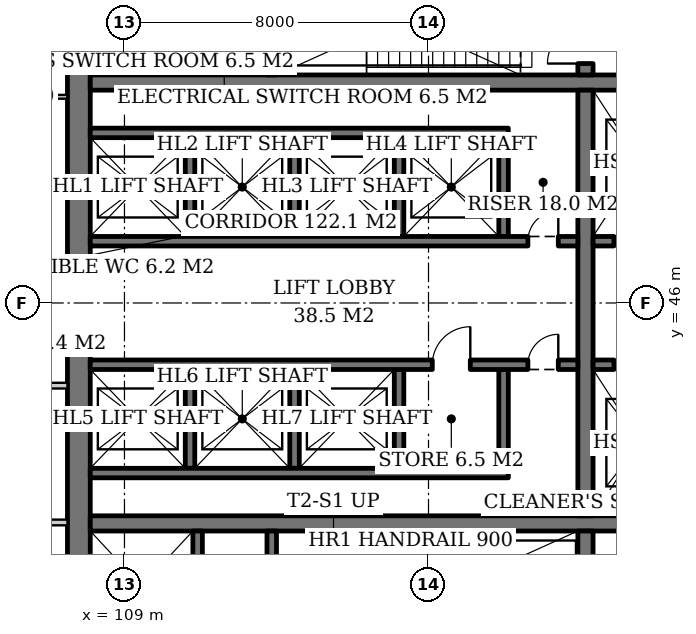
"""IFC4 building model, lengths in metres.
Left out: names, types, materials, properties, quantities, classifications, styles, units other than length and angle.
Written with IfcOpenShell. Run it as: python <this file> out.ifc"""

import sys

from ifc_helpers import new_model, si_unit, direction, frame, frame_2d, origin, place, context, subcontext, project, spatial, rectangle, extrude, element, fill, save


model = new_model("IFC4")
c1 = context("Model", 3, precision=1e-05, world=origin(), true_north=direction((0.0, 1.0)))
c2 = subcontext(c1, "Body", "Model", "MODEL_VIEW")
j1 = project(units=[si_unit("LENGTHUNIT", "METRE"), si_unit("PLANEANGLEUNIT", "RADIAN")], contexts=[c1])
p1 = place(None, origin())
s1 = spatial("IfcSite", under=j1, at=p1, CompositionType="ELEMENT")
p2 = place(p1, origin())
s2 = spatial("IfcBuilding", under=s1, at=p2, CompositionType="ELEMENT")
p3 = place(p2, frame((0.0, 0.0, 11.0)))
s3 = spatial("IfcBuildingStorey", under=s2, at=p3, CompositionType="ELEMENT", Elevation=11.0)
p4 = place(p3, frame((107.8, 37.1, 0.0), z_axis=(0.0, 0.0, 1.0), x_axis=(0.0, 1.0, 0.0)))
e1 = element("IfcWall", 1, at=p4, inside=s3, PredefinedType="SHEAR", context=c2, shape_type="SweptSolid", body=[
    extrude(rectangle(XDim=17.8, YDim=0.6, at=frame_2d((8.9, 0.0))), origin(), (0.0, 0.0, 1.0), 5.0),
])
p5 = place(p4, frame((8.0, 0.0, 0.0)))
e2 = element("IfcOpeningElement", 2, at=p5, cuts=e1, PredefinedType="OPENING", context=c2, shape_type="SweptSolid", body=[
    extrude(rectangle(XDim=1.8, YDim=2.4, at=frame_2d((0.9, 1.2))), frame((0.0, 0.31, 0.0), z_axis=(0.0, -1.0, 0.0), x_axis=(1.0, 0.0, 0.0)), (0.0, 0.0, 1.0), 0.62),
])
for number, where, z_axis, x_axis in (
    (3, (108.1, 40.2, 0.0), (0.0, 0.0, 1.0), (1.0, 0.0, 0.0)),
    (4, (108.1, 51.8, 0.0), (0.0, 0.0, 1.0), (1.0, 0.0, 0.0)),
):
    element("IfcWall", number, at=place(p3, frame(where, z_axis=z_axis, x_axis=x_axis)), inside=s3, PredefinedType="SHEAR", context=c2, shape_type="SweptSolid", body=[
        extrude(rectangle(XDim=17.8, YDim=0.4, at=frame_2d((8.9, 0.0))), origin(), (0.0, 0.0, 1.0), 5.0),
    ])
p6 = place(p3, frame((121.13, 37.1, 0.0), z_axis=(0.0, 0.0, 1.0), x_axis=(0.0, 1.0, 0.0)))
e5 = element("IfcWall", 5, at=p6, inside=s3, PredefinedType="SHEAR", context=c2, shape_type="SweptSolid", body=[
    extrude(rectangle(XDim=2.9, YDim=0.4, at=frame_2d((1.45, 0.0))), origin(), (0.0, 0.0, 1.0), 5.0),
])
p7 = place(p3, frame((121.13, 40.4, 0.0), z_axis=(0.0, 0.0, 1.0), x_axis=(0.0, 1.0, 0.0)))
e6 = element("IfcWall", 6, at=p7, inside=s3, PredefinedType="SHEAR", context=c2, shape_type="SweptSolid", body=[
    extrude(rectangle(XDim=11.2, YDim=0.4, at=frame_2d((5.6, 0.0))), origin(), (0.0, 0.0, 1.0), 5.0),
])
p8 = place(p3, frame((121.13, 52.0, 0.0), z_axis=(0.0, 0.0, 1.0), x_axis=(0.0, 1.0, 0.0)))
e7 = element("IfcWall", 7, at=p8, inside=s3, PredefinedType="SHEAR", context=c2, shape_type="SweptSolid", body=[
    extrude(rectangle(XDim=2.9, YDim=0.4, at=frame_2d((1.45, 0.0))), origin(), (0.0, 0.0, 1.0), 5.0),
])
p9 = place(p8, frame((0.3, 0.0, 0.0)))
e8 = element("IfcOpeningElement", 8, at=p9, cuts=e7, PredefinedType="OPENING", context=c2, shape_type="SweptSolid", body=[
    extrude(rectangle(XDim=1.0, YDim=2.1, at=frame_2d((0.5, 1.05))), frame((0.0, 0.21, 0.0), z_axis=(0.0, -1.0, 0.0), x_axis=(1.0, 0.0, 0.0)), (0.0, 0.0, 1.0), 0.42),
])
p10 = place(p3, frame((110.925, 37.1, 0.0), z_axis=(0.0, 0.0, 1.0), x_axis=(0.0, 1.0, 0.0)))
e9 = element("IfcWall", 9, at=p10, inside=s3, PredefinedType="SHEAR", context=c2, shape_type="SweptSolid", body=[
    extrude(rectangle(XDim=2.9, YDim=0.25, at=frame_2d((1.45, 0.0))), origin(), (0.0, 0.0, 1.0), 5.0),
])
p11 = place(p10, frame((0.8, 0.0, 0.0)))
e10 = element("IfcOpeningElement", 10, at=p11, cuts=e9, PredefinedType="OPENING", context=c2, shape_type="SweptSolid", body=[
    extrude(rectangle(XDim=1.3, YDim=2.2, at=frame_2d((0.65, 1.1))), frame((0.0, 0.135, 0.0), z_axis=(0.0, -1.0, 0.0), x_axis=(1.0, 0.0, 0.0)), (0.0, 0.0, 1.0), 0.27),
])
p12 = place(p3, frame((112.875, 37.1, 0.0), z_axis=(0.0, 0.0, 1.0), x_axis=(0.0, 1.0, 0.0)))
e11 = element("IfcWall", 11, at=p12, inside=s3, PredefinedType="SHEAR", context=c2, shape_type="SweptSolid", body=[
    extrude(rectangle(XDim=2.9, YDim=0.25, at=frame_2d((1.45, 0.0))), origin(), (0.0, 0.0, 1.0), 5.0),
])
p13 = place(p12, frame((0.75, 0.0, 0.0)))
e12 = element("IfcOpeningElement", 12, at=p13, cuts=e11, PredefinedType="OPENING", context=c2, shape_type="SweptSolid", body=[
    extrude(rectangle(XDim=1.2, YDim=2.1, at=frame_2d((0.6, 1.05))), frame((0.0, 0.135, 0.0), z_axis=(0.0, -1.0, 0.0), x_axis=(1.0, 0.0, 0.0)), (0.0, 0.0, 1.0), 0.27),
])
p14 = place(p3, frame((112.875, 52.0, 0.0), z_axis=(0.0, 0.0, 1.0), x_axis=(0.0, 1.0, 0.0)))
e13 = element("IfcWall", 13, at=p14, inside=s3, PredefinedType="SHEAR", context=c2, shape_type="SweptSolid", body=[
    extrude(rectangle(XDim=2.9, YDim=0.25, at=frame_2d((1.45, 0.0))), origin(), (0.0, 0.0, 1.0), 5.0),
])
for number, where, z_axis, x_axis in (
    (14, (110.725, 47.75, 0.0), (0.0, 0.0, 1.0), (0.0, 1.0, 0.0)),
    (15, (113.475, 47.75, 0.0), (0.0, 0.0, 1.0), (0.0, 1.0, 0.0)),
    (16, (116.225, 47.75, 0.0), (0.0, 0.0, 1.0), (0.0, 1.0, 0.0)),
    (17, (118.975, 47.75, 0.0), (0.0, 0.0, 1.0), (0.0, 1.0, 0.0)),
):
    element("IfcWall", number, at=place(p3, frame(where, z_axis=z_axis, x_axis=x_axis)), inside=s3, PredefinedType="SHEAR", context=c2, shape_type="SweptSolid", body=[
        extrude(rectangle(XDim=2.6, YDim=0.25, at=frame_2d((1.3, 0.0))), origin(), (0.0, 0.0, 1.0), 5.0),
    ])
p15 = place(p3, frame((108.1, 50.475, 0.0), z_axis=(0.0, 0.0, 1.0), x_axis=(1.0, 0.0, 0.0)))
e18 = element("IfcWall", 18, at=p15, inside=s3, PredefinedType="SHEAR", context=c2, shape_type="SweptSolid", body=[
    extrude(rectangle(XDim=11.0, YDim=0.25, at=frame_2d((5.5, 0.0))), origin(), (0.0, 0.0, 1.0), 5.0),
])
p16 = place(p3, frame((108.1, 47.625, 0.0), z_axis=(0.0, 0.0, 1.0), x_axis=(1.0, 0.0, 0.0)))
e19 = element("IfcWall", 19, at=p16, inside=s3, PredefinedType="SHEAR", context=c2, shape_type="SweptSolid", body=[
    extrude(rectangle(XDim=12.83, YDim=0.25, at=frame_2d((6.415, 0.0))), origin(), (0.0, 0.0, 1.0), 5.0),
])
p17 = place(p16, frame((11.515, 0.0, 0.0)))
e20 = element("IfcOpeningElement", 20, at=p17, cuts=e19, PredefinedType="OPENING", context=c2, shape_type="SweptSolid", body=[
    extrude(rectangle(XDim=0.8, YDim=2.0, at=frame_2d((0.4, 1.0))), frame((0.0, 0.135, 0.0), z_axis=(0.0, -1.0, 0.0), x_axis=(1.0, 0.0, 0.0)), (0.0, 0.0, 1.0), 0.27),
])
for number, where, z_axis, x_axis in (
    (21, (110.725, 44.25, 0.0), (0.0, 0.0, 1.0), (0.0, -1.0, 0.0)),
    (22, (113.475, 44.25, 0.0), (0.0, 0.0, 1.0), (0.0, -1.0, 0.0)),
    (23, (116.225, 44.25, 0.0), (0.0, 0.0, 1.0), (0.0, -1.0, 0.0)),
    (24, (118.975, 44.25, 0.0), (0.0, 0.0, 1.0), (0.0, -1.0, 0.0)),
):
    element("IfcWall", number, at=place(p3, frame(where, z_axis=z_axis, x_axis=x_axis)), inside=s3, PredefinedType="SHEAR", context=c2, shape_type="SweptSolid", body=[
        extrude(rectangle(XDim=2.6, YDim=0.25, at=frame_2d((1.3, 0.0))), origin(), (0.0, 0.0, 1.0), 5.0),
    ])
p18 = place(p3, frame((108.1, 41.525, 0.0), z_axis=(0.0, 0.0, 1.0), x_axis=(1.0, 0.0, 0.0)))
e25 = element("IfcWall", 25, at=p18, inside=s3, PredefinedType="SHEAR", context=c2, shape_type="SweptSolid", body=[
    extrude(rectangle(XDim=11.0, YDim=0.25, at=frame_2d((5.5, 0.0))), origin(), (0.0, 0.0, 1.0), 5.0),
])
p19 = place(p3, frame((108.1, 44.375, 0.0), z_axis=(0.0, 0.0, 1.0), x_axis=(1.0, 0.0, 0.0)))
e26 = element("IfcWall", 26, at=p19, inside=s3, PredefinedType="SHEAR", context=c2, shape_type="SweptSolid", body=[
    extrude(rectangle(XDim=12.83, YDim=0.25, at=frame_2d((6.415, 0.0))), origin(), (0.0, 0.0, 1.0), 5.0),
])
p20 = place(p19, frame((9.0, 0.0, 0.0)))
e27 = element("IfcOpeningElement", 27, at=p20, cuts=e26, PredefinedType="OPENING", context=c2, shape_type="SweptSolid", body=[
    extrude(rectangle(XDim=1.0, YDim=2.1, at=frame_2d((0.5, 1.05))), frame((0.0, 0.135, 0.0), z_axis=(0.0, -1.0, 0.0), x_axis=(1.0, 0.0, 0.0)), (0.0, 0.0, 1.0), 0.27),
])
p21 = place(p19, frame((11.515, 0.0, 0.0)))
e28 = element("IfcOpeningElement", 28, at=p21, cuts=e26, PredefinedType="OPENING", context=c2, shape_type="SweptSolid", body=[
    extrude(rectangle(XDim=0.8, YDim=2.0, at=frame_2d((0.4, 1.0))), frame((0.0, 0.135, 0.0), z_axis=(0.0, -1.0, 0.0), x_axis=(1.0, 0.0, 0.0)), (0.0, 0.0, 1.0), 0.27),
])
p22 = place(p3, frame((121.33, 47.625, 0.0), z_axis=(0.0, 0.0, 1.0), x_axis=(1.0, 0.0, 0.0)))
e29 = element("IfcWall", 29, at=p22, inside=s3, PredefinedType="SHEAR", context=c2, shape_type="SweptSolid", body=[
    extrude(rectangle(XDim=4.57, YDim=0.25, at=frame_2d((2.285, 0.0))), origin(), (0.0, 0.0, 1.0), 5.0),
])
p23 = place(p22, frame((0.55, 0.0, 0.0)))
e30 = element("IfcOpeningElement", 30, at=p23, cuts=e29, PredefinedType="OPENING", context=c2, shape_type="SweptSolid", body=[
    extrude(rectangle(XDim=1.4, YDim=2.4, at=frame_2d((0.7, 1.2))), frame((0.0, 0.135, 0.0), z_axis=(0.0, -1.0, 0.0), x_axis=(1.0, 0.0, 0.0)), (0.0, 0.0, 1.0), 0.27),
])
p24 = place(p22, frame((3.26, 0.0, 0.0)))
e31 = element("IfcOpeningElement", 31, at=p24, cuts=e29, PredefinedType="OPENING", context=c2, shape_type="SweptSolid", body=[
    extrude(rectangle(XDim=0.8, YDim=2.0, at=frame_2d((0.4, 1.0))), frame((0.0, 0.135, 0.0), z_axis=(0.0, -1.0, 0.0), x_axis=(1.0, 0.0, 0.0)), (0.0, 0.0, 1.0), 0.27),
])
p25 = place(p3, frame((121.33, 44.375, 0.0), z_axis=(0.0, 0.0, 1.0), x_axis=(1.0, 0.0, 0.0)))
e32 = element("IfcWall", 32, at=p25, inside=s3, PredefinedType="SHEAR", context=c2, shape_type="SweptSolid", body=[
    extrude(rectangle(XDim=4.57, YDim=0.25, at=frame_2d((2.285, 0.0))), origin(), (0.0, 0.0, 1.0), 5.0),
])
p26 = place(p25, frame((0.55, 0.0, 0.0)))
e33 = element("IfcOpeningElement", 33, at=p26, cuts=e32, PredefinedType="OPENING", context=c2, shape_type="SweptSolid", body=[
    extrude(rectangle(XDim=1.4, YDim=2.4, at=frame_2d((0.7, 1.2))), frame((0.0, 0.135, 0.0), z_axis=(0.0, -1.0, 0.0), x_axis=(1.0, 0.0, 0.0)), (0.0, 0.0, 1.0), 0.27),
])
p27 = place(p25, frame((3.26, 0.0, 0.0)))
e34 = element("IfcOpeningElement", 34, at=p27, cuts=e32, PredefinedType="OPENING", context=c2, shape_type="SweptSolid", body=[
    extrude(rectangle(XDim=0.8, YDim=2.0, at=frame_2d((0.4, 1.0))), frame((0.0, 0.135, 0.0), z_axis=(0.0, -1.0, 0.0), x_axis=(1.0, 0.0, 0.0)), (0.0, 0.0, 1.0), 0.27),
])
p28 = place(p3, frame((110.425, 52.0, 0.0), z_axis=(0.0, 0.0, 1.0), x_axis=(0.0, 1.0, 0.0)))
e35 = element("IfcWall", 35, at=p28, inside=s3, PredefinedType="SOLIDWALL", context=c2, shape_type="SweptSolid", body=[
    extrude(rectangle(XDim=2.9, YDim=0.15, at=frame_2d((1.45, 0.0))), origin(), (0.0, 0.0, 1.0), 4.7),
])
p29 = place(p3, frame((104.975, 51.425, 0.0), z_axis=(0.0, 0.0, 1.0), x_axis=(1.0, 0.0, 0.0)))
e36 = element("IfcWall", 36, at=p29, inside=s3, PredefinedType="SOLIDWALL", context=c2, shape_type="SweptSolid", body=[
    extrude(rectangle(XDim=2.525, YDim=0.1, at=frame_2d((1.262, 0.0))), origin(), (0.0, 0.0, 1.0), 4.7),
])
for number, where, z_axis, x_axis in (
    (37, (104.975, 49.025, 0.0), (0.0, 0.0, 1.0), (1.0, 0.0, 0.0)),
    (38, (104.975, 43.825, 0.0), (0.0, 0.0, 1.0), (1.0, 0.0, 0.0)),
    (39, (104.975, 40.225, 0.0), (0.0, 0.0, 1.0), (1.0, 0.0, 0.0)),
):
    element("IfcWall", number, at=place(p3, frame(where, z_axis=z_axis, x_axis=x_axis)), inside=s3, PredefinedType="PARTITIONING", context=c2, shape_type="SweptSolid", body=[
        extrude(rectangle(XDim=2.525, YDim=0.15, at=frame_2d((1.262, 0.0))), origin(), (0.0, 0.0, 1.0), 4.7),
    ])
p30 = place(p17, origin())
e40 = element("IfcDoor", 40, at=p30, inside=s3, OperationType="SINGLE_SWING_RIGHT", PredefinedType="DOOR", context=c2, shape_type="SweptSolid", body=[
    extrude(rectangle(XDim=0.8, YDim=2.0, at=frame_2d((0.4, 1.0))), frame((0.0, 0.025, 0.0), z_axis=(0.0, -1.0, 0.0), x_axis=(1.0, 0.0, 0.0)), (0.0, 0.0, 1.0), 0.05),
])
fill(e20, e40)
p31 = place(p20, origin())
e41 = element("IfcDoor", 41, at=p31, inside=s3, OperationType="SINGLE_SWING_RIGHT", PredefinedType="DOOR", context=c2, shape_type="SweptSolid", body=[
    extrude(rectangle(XDim=1.0, YDim=2.1, at=frame_2d((0.5, 1.05))), frame((0.0, 0.025, 0.0), z_axis=(0.0, -1.0, 0.0), x_axis=(1.0, 0.0, 0.0)), (0.0, 0.0, 1.0), 0.05),
])
fill(e27, e41)
p32 = place(p21, origin())
e42 = element("IfcDoor", 42, at=p32, inside=s3, OperationType="SINGLE_SWING_RIGHT", PredefinedType="DOOR", context=c2, shape_type="SweptSolid", body=[
    extrude(rectangle(XDim=0.8, YDim=2.0, at=frame_2d((0.4, 1.0))), frame((0.0, 0.025, 0.0), z_axis=(0.0, -1.0, 0.0), x_axis=(1.0, 0.0, 0.0)), (0.0, 0.0, 1.0), 0.05),
])
fill(e28, e42)
p33 = place(p23, origin())
e43 = element("IfcDoor", 43, at=p33, inside=s3, OperationType="DOUBLE_DOOR_SLIDING", PredefinedType="DOOR", context=c2, shape_type="SweptSolid", body=[
    extrude(rectangle(XDim=1.4, YDim=2.4, at=frame_2d((0.7, 1.2))), frame((0.0, 0.025, 0.0), z_axis=(0.0, -1.0, 0.0), x_axis=(1.0, 0.0, 0.0)), (0.0, 0.0, 1.0), 0.05),
])
fill(e30, e43)
p34 = place(p26, origin())
e44 = element("IfcDoor", 44, at=p34, inside=s3, OperationType="DOUBLE_DOOR_SLIDING", PredefinedType="DOOR", context=c2, shape_type="SweptSolid", body=[
    extrude(rectangle(XDim=1.4, YDim=2.4, at=frame_2d((0.7, 1.2))), frame((0.0, 0.025, 0.0), z_axis=(0.0, -1.0, 0.0), x_axis=(1.0, 0.0, 0.0)), (0.0, 0.0, 1.0), 0.05),
])
fill(e33, e44)
p35 = place(p9, origin())
e45 = element("IfcDoor", 45, at=p35, inside=s3, OperationType="SINGLE_SWING_LEFT", PredefinedType="DOOR", context=c2, shape_type="SweptSolid", body=[
    extrude(rectangle(XDim=1.0, YDim=2.1, at=frame_2d((0.5, 1.05))), frame((0.0, 0.025, 0.0), z_axis=(0.0, -1.0, 0.0), x_axis=(1.0, 0.0, 0.0)), (0.0, 0.0, 1.0), 0.05),
])
fill(e8, e45)
p36 = place(p5, origin())
e46 = element("IfcDoor", 46, at=p36, inside=s3, OperationType="DOUBLE_DOOR_SINGLE_SWING", PredefinedType="DOOR", context=c2, shape_type="SweptSolid", body=[
    extrude(rectangle(XDim=1.8, YDim=2.4, at=frame_2d((0.9, 1.2))), frame((0.0, 0.025, 0.0), z_axis=(0.0, -1.0, 0.0), x_axis=(1.0, 0.0, 0.0)), (0.0, 0.0, 1.0), 0.05),
])
fill(e2, e46)
save(model, sys.argv[1])
